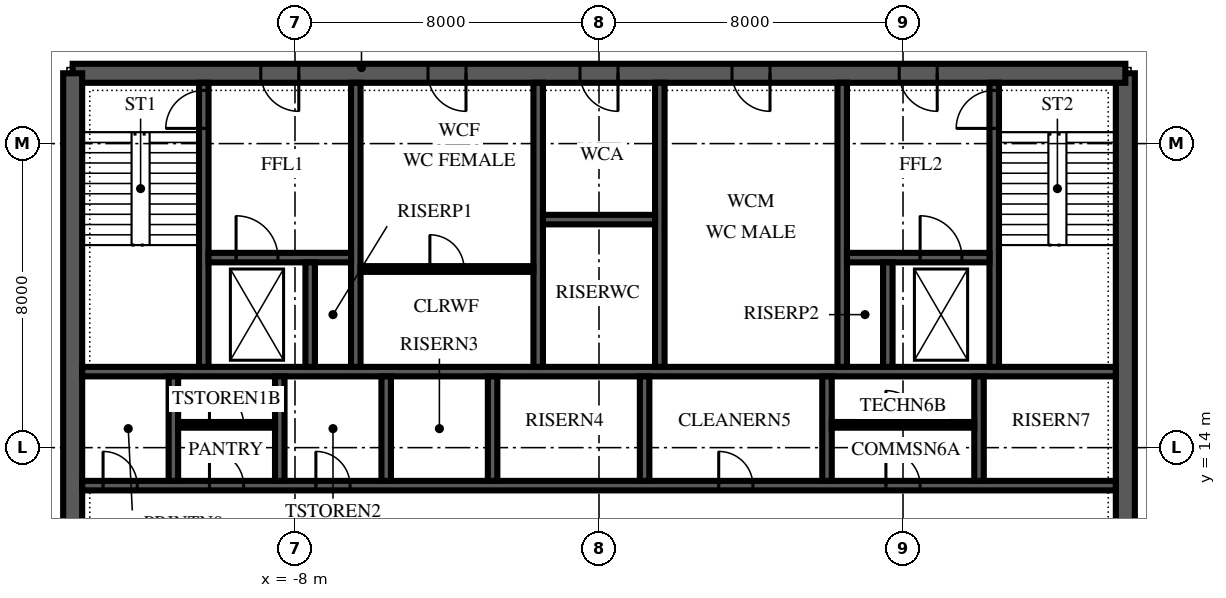
"""IFC4 building model, lengths in metres.
Left out: names, types, materials, properties, quantities, classifications, styles, units other than length and angle.
Written with IfcOpenShell. Run it as: python <this file> out.ifc"""

import sys

from ifc_helpers import new_model, si_unit, direction, frame, frame_2d, origin, place, context, subcontext, project, spatial, polyline, rectangle, outline, extrude, element, fill, save


model = new_model("IFC4")
c1 = context("Model", 3, precision=1e-05, world=origin(), true_north=direction((0.0, 1.0)))
c2 = subcontext(c1, "Body", "Model", "MODEL_VIEW")
j1 = project(units=[si_unit("LENGTHUNIT", "METRE"), si_unit("PLANEANGLEUNIT", "RADIAN")], contexts=[c1])
p1 = place(None, origin())
s1 = spatial("IfcSite", under=j1, at=p1, CompositionType="ELEMENT")
p2 = place(p1, origin())
s2 = spatial("IfcBuilding", under=s1, at=p2, CompositionType="ELEMENT")
p3 = place(p2, frame((0.0, 0.0, 248.0)))
s3 = spatial("IfcBuildingStorey", under=s2, at=p3, CompositionType="ELEMENT", Elevation=248.0)
p4 = place(p3, frame((13.85, 6.15, 0.0), z_axis=(0.0, 0.0, 1.0), x_axis=(0.0, 1.0, 0.0)))
e1 = element("IfcWall", 1, at=p4, inside=s3, PredefinedType="SHEAR", context=c2, shape_type="SweptSolid", body=[
    extrude(outline(polyline([(0.0, -0.25), (17.7, -0.25), (17.7, 0.0), (17.45, 0.0), (17.45, 0.25), (0.25, 0.25), (0.25, 0.0), (0.0, 0.0), (0.0, -0.25)])), origin(), (0.0, 0.0, 1.0), 4.0),
])
p5 = place(p4, frame((4.15, 0.0, 0.0)))
e2 = element("IfcOpeningElement", 2, at=p5, cuts=e1, PredefinedType="OPENING", context=c2, shape_type="SweptSolid", body=[
    extrude(rectangle(XDim=1.8, YDim=2.4, at=frame_2d((0.9, 1.2))), frame((0.0, 0.265, 0.0), z_axis=(0.0, -1.0, 0.0), x_axis=(1.0, 0.0, 0.0)), (0.0, 0.0, 1.0), 0.53),
])
p6 = place(p3, frame((13.85, 23.85, 0.0), z_axis=(0.0, 0.0, 1.0), x_axis=(-1.0, 0.0, 0.0)))
e3 = element("IfcWall", 3, at=p6, inside=s3, PredefinedType="SHEAR", context=c2, shape_type="SweptSolid", body=[
    extrude(rectangle(XDim=27.7, YDim=0.5, at=frame_2d((13.85, 0.0))), origin(), (0.0, 0.0, 1.0), 4.0),
])
p7 = place(p6, frame((21.75, 0.0, 0.0)))
e4 = element("IfcOpeningElement", 4, at=p7, cuts=e3, PredefinedType="OPENING", context=c2, shape_type="SweptSolid", body=[
    extrude(rectangle(XDim=1.0, YDim=2.1, at=frame_2d((0.5, 1.05))), frame((0.0, 0.265, 0.0), z_axis=(0.0, -1.0, 0.0), x_axis=(1.0, 0.0, 0.0)), (0.0, 0.0, 1.0), 0.53),
])
p8 = place(p6, frame((4.95, 0.0, 0.0)))
e5 = element("IfcOpeningElement", 5, at=p8, cuts=e3, PredefinedType="OPENING", context=c2, shape_type="SweptSolid", body=[
    extrude(rectangle(XDim=1.0, YDim=2.1, at=frame_2d((0.5, 1.05))), frame((0.0, 0.265, 0.0), z_axis=(0.0, -1.0, 0.0), x_axis=(1.0, 0.0, 0.0)), (0.0, 0.0, 1.0), 0.53),
])
p9 = place(p6, frame((17.35, 0.0, 0.0)))
e6 = element("IfcOpeningElement", 6, at=p9, cuts=e3, PredefinedType="OPENING", context=c2, shape_type="SweptSolid", body=[
    extrude(rectangle(XDim=1.0, YDim=2.1, at=frame_2d((0.5, 1.05))), frame((0.0, 0.265, 0.0), z_axis=(0.0, -1.0, 0.0), x_axis=(1.0, 0.0, 0.0)), (0.0, 0.0, 1.0), 0.53),
])
p10 = place(p6, frame((13.35, 0.0, 0.0)))
e7 = element("IfcOpeningElement", 7, at=p10, cuts=e3, PredefinedType="OPENING", context=c2, shape_type="SweptSolid", body=[
    extrude(rectangle(XDim=1.0, YDim=2.1, at=frame_2d((0.5, 1.05))), frame((0.0, 0.265, 0.0), z_axis=(0.0, -1.0, 0.0), x_axis=(1.0, 0.0, 0.0)), (0.0, 0.0, 1.0), 0.53),
])
p11 = place(p6, frame((9.35, 0.0, 0.0)))
e8 = element("IfcOpeningElement", 8, at=p11, cuts=e3, PredefinedType="OPENING", context=c2, shape_type="SweptSolid", body=[
    extrude(rectangle(XDim=1.0, YDim=2.1, at=frame_2d((0.5, 1.05))), frame((0.0, 0.265, 0.0), z_axis=(0.0, -1.0, 0.0), x_axis=(1.0, 0.0, 0.0)), (0.0, 0.0, 1.0), 0.53),
])
p12 = place(p3, frame((-13.85, 23.85, 0.0), z_axis=(0.0, 0.0, 1.0), x_axis=(0.0, -1.0, 0.0)))
e9 = element("IfcWall", 9, at=p12, inside=s3, PredefinedType="SHEAR", context=c2, shape_type="SweptSolid", body=[
    extrude(outline(polyline([(0.0, -0.25), (17.7, -0.25), (17.7, 0.0), (17.45, 0.0), (17.45, 0.25), (0.25, 0.25), (0.25, 0.0), (0.0, 0.0), (0.0, -0.25)])), origin(), (0.0, 0.0, 1.0), 4.0),
])
p13 = place(p12, frame((11.75, 0.0, 0.0)))
e10 = element("IfcOpeningElement", 10, at=p13, cuts=e9, PredefinedType="OPENING", context=c2, shape_type="SweptSolid", body=[
    extrude(rectangle(XDim=1.8, YDim=2.4, at=frame_2d((0.9, 1.2))), frame((0.0, 0.265, 0.0), z_axis=(0.0, -1.0, 0.0), x_axis=(1.0, 0.0, 0.0)), (0.0, 0.0, 1.0), 0.53),
])
p14 = place(p3, frame((-13.6, 13.0, 0.0), z_axis=(0.0, 0.0, 1.0), x_axis=(1.0, 0.0, 0.0)))
e11 = element("IfcWall", 11, at=p14, inside=s3, PredefinedType="SHEAR", context=c2, shape_type="SweptSolid", body=[
    extrude(rectangle(XDim=27.2, YDim=0.25, at=frame_2d((13.6, 0.0))), origin(), (0.0, 0.0, 1.0), 4.0),
])
p15 = place(p14, frame((16.75, 0.0, 0.0)))
e12 = element("IfcOpeningElement", 12, at=p15, cuts=e11, PredefinedType="OPENING", context=c2, shape_type="SweptSolid", body=[
    extrude(rectangle(XDim=0.9, YDim=2.1, at=frame_2d((0.45, 1.05))), frame((0.0, 0.14, 0.0), z_axis=(0.0, -1.0, 0.0), x_axis=(1.0, 0.0, 0.0)), (0.0, 0.0, 1.0), 0.28),
])
p16 = place(p14, frame((21.15, 0.0, 0.0)))
e13 = element("IfcOpeningElement", 13, at=p16, cuts=e11, PredefinedType="OPENING", context=c2, shape_type="SweptSolid", body=[
    extrude(rectangle(XDim=0.9, YDim=2.1, at=frame_2d((0.45, 1.05))), frame((0.0, 0.14, 0.0), z_axis=(0.0, -1.0, 0.0), x_axis=(1.0, 0.0, 0.0)), (0.0, 0.0, 1.0), 0.28),
])
p17 = place(p14, frame((0.55, 0.0, 0.0)))
e14 = element("IfcOpeningElement", 14, at=p17, cuts=e11, PredefinedType="OPENING", context=c2, shape_type="SweptSolid", body=[
    extrude(rectangle(XDim=0.9, YDim=2.1, at=frame_2d((0.45, 1.05))), frame((0.0, 0.14, 0.0), z_axis=(0.0, -1.0, 0.0), x_axis=(1.0, 0.0, 0.0)), (0.0, 0.0, 1.0), 0.28),
])
p18 = place(p14, frame((3.35, 0.0, 0.0)))
e15 = element("IfcOpeningElement", 15, at=p18, cuts=e11, PredefinedType="OPENING", context=c2, shape_type="SweptSolid", body=[
    extrude(rectangle(XDim=0.9, YDim=2.1, at=frame_2d((0.45, 1.05))), frame((0.0, 0.14, 0.0), z_axis=(0.0, -1.0, 0.0), x_axis=(1.0, 0.0, 0.0)), (0.0, 0.0, 1.0), 0.28),
])
p19 = place(p14, frame((6.15, 0.0, 0.0)))
e16 = element("IfcOpeningElement", 16, at=p19, cuts=e11, PredefinedType="OPENING", context=c2, shape_type="SweptSolid", body=[
    extrude(rectangle(XDim=0.9, YDim=2.1, at=frame_2d((0.45, 1.05))), frame((0.0, 0.14, 0.0), z_axis=(0.0, -1.0, 0.0), x_axis=(1.0, 0.0, 0.0)), (0.0, 0.0, 1.0), 0.28),
])
p20 = place(p3, frame((-13.6, 16.0, 0.0), z_axis=(0.0, 0.0, 1.0), x_axis=(1.0, 0.0, 0.0)))
e17 = element("IfcWall", 17, at=p20, inside=s3, PredefinedType="SHEAR", context=c2, shape_type="SweptSolid", body=[
    extrude(rectangle(XDim=27.2, YDim=0.25, at=frame_2d((13.6, 0.0))), origin(), (0.0, 0.0, 1.0), 4.0),
])
for number, where, z_axis, x_axis in (
    (18, (-11.2, 13.125, 0.0), (0.0, 0.0, 1.0), (0.0, 1.0, 0.0)),
    (19, (-8.4, 13.125, 0.0), (0.0, 0.0, 1.0), (0.0, 1.0, 0.0)),
    (20, (-5.6, 13.125, 0.0), (0.0, 0.0, 1.0), (0.0, 1.0, 0.0)),
    (21, (-2.8, 13.125, 0.0), (0.0, 0.0, 1.0), (0.0, 1.0, 0.0)),
    (22, (1.2, 13.125, 0.0), (0.0, 0.0, 1.0), (0.0, 1.0, 0.0)),
    (23, (6.0, 13.125, 0.0), (0.0, 0.0, 1.0), (0.0, 1.0, 0.0)),
    (24, (10.0, 13.125, 0.0), (0.0, 0.0, 1.0), (0.0, 1.0, 0.0)),
):
    element("IfcWall", number, at=place(p3, frame(where, z_axis=z_axis, x_axis=x_axis)), inside=s3, PredefinedType="SHEAR", context=c2, shape_type="SweptSolid", body=[
        extrude(rectangle(XDim=2.75, YDim=0.25, at=frame_2d((1.375, 0.0))), origin(), (0.0, 0.0, 1.0), 4.0),
    ])
p21 = place(p3, frame((-10.4, 16.125, 0.0), z_axis=(0.0, 0.0, 1.0), x_axis=(0.0, 1.0, 0.0)))
e25 = element("IfcWall", 25, at=p21, inside=s3, PredefinedType="SHEAR", context=c2, shape_type="SweptSolid", body=[
    extrude(rectangle(XDim=7.475, YDim=0.25, at=frame_2d((3.738, 0.0))), origin(), (0.0, 0.0, 1.0), 4.0),
])
p22 = place(p21, frame((6.275, 0.0, 0.0)))
e26 = element("IfcOpeningElement", 26, at=p22, cuts=e25, PredefinedType="OPENING", context=c2, shape_type="SweptSolid", body=[
    extrude(rectangle(XDim=1.0, YDim=2.1, at=frame_2d((0.5, 1.05))), frame((0.0, 0.14, 0.0), z_axis=(0.0, -1.0, 0.0), x_axis=(1.0, 0.0, 0.0)), (0.0, 0.0, 1.0), 0.28),
])
for number, where, z_axis, x_axis in (
    (27, (-6.4, 16.125, 0.0), (0.0, 0.0, 1.0), (0.0, 1.0, 0.0)),
    (28, (-1.6, 16.125, 0.0), (0.0, 0.0, 1.0), (0.0, 1.0, 0.0)),
    (29, (1.6, 16.125, 0.0), (0.0, 0.0, 1.0), (0.0, 1.0, 0.0)),
    (30, (6.4, 16.125, 0.0), (0.0, 0.0, 1.0), (0.0, 1.0, 0.0)),
):
    element("IfcWall", number, at=place(p3, frame(where, z_axis=z_axis, x_axis=x_axis)), inside=s3, PredefinedType="SHEAR", context=c2, shape_type="SweptSolid", body=[
        extrude(rectangle(XDim=7.475, YDim=0.25, at=frame_2d((3.738, 0.0))), origin(), (0.0, 0.0, 1.0), 4.0),
    ])
p23 = place(p3, frame((10.4, 16.125, 0.0), z_axis=(0.0, 0.0, 1.0), x_axis=(0.0, 1.0, 0.0)))
e31 = element("IfcWall", 31, at=p23, inside=s3, PredefinedType="SHEAR", context=c2, shape_type="SweptSolid", body=[
    extrude(rectangle(XDim=7.475, YDim=0.25, at=frame_2d((3.738, 0.0))), origin(), (0.0, 0.0, 1.0), 4.0),
])
p24 = place(p23, frame((6.275, 0.0, 0.0)))
e32 = element("IfcOpeningElement", 32, at=p24, cuts=e31, PredefinedType="OPENING", context=c2, shape_type="SweptSolid", body=[
    extrude(rectangle(XDim=1.0, YDim=2.1, at=frame_2d((0.5, 1.05))), frame((0.0, 0.14, 0.0), z_axis=(0.0, -1.0, 0.0), x_axis=(1.0, 0.0, 0.0)), (0.0, 0.0, 1.0), 0.28),
])
p25 = place(p3, frame((-10.275, 19.0, 0.0), z_axis=(0.0, 0.0, 1.0), x_axis=(1.0, 0.0, 0.0)))
e33 = element("IfcWall", 33, at=p25, inside=s3, PredefinedType="SHEAR", context=c2, shape_type="SweptSolid", body=[
    extrude(rectangle(XDim=3.75, YDim=0.25, at=frame_2d((1.875, 0.0))), origin(), (0.0, 0.0, 1.0), 4.0),
])
p26 = place(p25, frame((0.725, 0.0, 0.0)))
e34 = element("IfcOpeningElement", 34, at=p26, cuts=e33, PredefinedType="OPENING", context=c2, shape_type="SweptSolid", body=[
    extrude(rectangle(XDim=1.1, YDim=2.1, at=frame_2d((0.55, 1.05))), frame((0.0, 0.14, 0.0), z_axis=(0.0, -1.0, 0.0), x_axis=(1.0, 0.0, 0.0)), (0.0, 0.0, 1.0), 0.28),
])
p27 = place(p3, frame((6.525, 19.0, 0.0), z_axis=(0.0, 0.0, 1.0), x_axis=(1.0, 0.0, 0.0)))
e35 = element("IfcWall", 35, at=p27, inside=s3, PredefinedType="SHEAR", context=c2, shape_type="SweptSolid", body=[
    extrude(rectangle(XDim=3.75, YDim=0.25, at=frame_2d((1.875, 0.0))), origin(), (0.0, 0.0, 1.0), 4.0),
])
p28 = place(p27, frame((1.925, 0.0, 0.0)))
e36 = element("IfcOpeningElement", 36, at=p28, cuts=e35, PredefinedType="OPENING", context=c2, shape_type="SweptSolid", body=[
    extrude(rectangle(XDim=1.1, YDim=2.1, at=frame_2d((0.55, 1.05))), frame((0.0, 0.14, 0.0), z_axis=(0.0, -1.0, 0.0), x_axis=(1.0, 0.0, 0.0)), (0.0, 0.0, 1.0), 0.28),
])
for number, where, z_axis, x_axis in (
    (37, (-7.6, 16.125, 0.0), (0.0, 0.0, 1.0), (0.0, 1.0, 0.0)),
    (38, (7.6, 16.125, 0.0), (0.0, 0.0, 1.0), (0.0, 1.0, 0.0)),
):
    element("IfcWall", number, at=place(p3, frame(where, z_axis=z_axis, x_axis=x_axis)), inside=s3, PredefinedType="SHEAR", context=c2, shape_type="SweptSolid", body=[
        extrude(rectangle(XDim=2.75, YDim=0.25, at=frame_2d((1.375, 0.0))), origin(), (0.0, 0.0, 1.0), 4.0),
    ])
p29 = place(p3, frame((-1.475, 20.0, 0.0), z_axis=(0.0, 0.0, 1.0), x_axis=(1.0, 0.0, 0.0)))
e39 = element("IfcWall", 39, at=p29, inside=s3, PredefinedType="SHEAR", context=c2, shape_type="SweptSolid", body=[
    extrude(rectangle(XDim=2.95, YDim=0.25, at=frame_2d((1.475, 0.0))), origin(), (0.0, 0.0, 1.0), 4.0),
])
p30 = place(p3, frame((-6.275, 18.7, 0.0), z_axis=(0.0, 0.0, 1.0), x_axis=(1.0, 0.0, 0.0)))
e40 = element("IfcWall", 40, at=p30, inside=s3, PredefinedType="PARTITIONING", context=c2, shape_type="SweptSolid", body=[
    extrude(rectangle(XDim=4.55, YDim=0.15, at=frame_2d((2.275, 0.0))), origin(), (0.0, 0.0, 1.0), 3.85),
])
p31 = place(p30, frame((1.825, 0.0, 0.0)))
e41 = element("IfcOpeningElement", 41, at=p31, cuts=e40, PredefinedType="OPENING", context=c2, shape_type="SweptSolid", body=[
    extrude(rectangle(XDim=0.9, YDim=2.1, at=frame_2d((0.45, 1.05))), frame((0.0, 0.09, 0.0), z_axis=(0.0, -1.0, 0.0), x_axis=(1.0, 0.0, 0.0)), (0.0, 0.0, 1.0), 0.18),
])
p32 = place(p3, frame((6.125, 14.6, 0.0), z_axis=(0.0, 0.0, 1.0), x_axis=(1.0, 0.0, 0.0)))
e42 = element("IfcWall", 42, at=p32, inside=s3, PredefinedType="PARTITIONING", context=c2, shape_type="SweptSolid", body=[
    extrude(rectangle(XDim=3.75, YDim=0.15, at=frame_2d((1.875, 0.0))), origin(), (0.0, 0.0, 1.0), 3.85),
])
p33 = place(p32, frame((1.425, 0.0, 0.0)))
e43 = element("IfcOpeningElement", 43, at=p33, cuts=e42, PredefinedType="OPENING", context=c2, shape_type="SweptSolid", body=[
    extrude(rectangle(XDim=0.9, YDim=2.1, at=frame_2d((0.45, 1.05))), frame((0.0, 0.09, 0.0), z_axis=(0.0, -1.0, 0.0), x_axis=(1.0, 0.0, 0.0)), (0.0, 0.0, 1.0), 0.18),
])
p34 = place(p3, frame((-11.075, 14.6, 0.0), z_axis=(0.0, 0.0, 1.0), x_axis=(1.0, 0.0, 0.0)))
e44 = element("IfcWall", 44, at=p34, inside=s3, PredefinedType="PARTITIONING", context=c2, shape_type="SweptSolid", body=[
    extrude(rectangle(XDim=2.55, YDim=0.15, at=frame_2d((1.275, 0.0))), origin(), (0.0, 0.0, 1.0), 3.85),
])
p35 = place(p34, frame((0.825, 0.0, 0.0)))
e45 = element("IfcOpeningElement", 45, at=p35, cuts=e44, PredefinedType="OPENING", context=c2, shape_type="SweptSolid", body=[
    extrude(rectangle(XDim=0.9, YDim=2.1, at=frame_2d((0.45, 1.05))), frame((0.0, 0.09, 0.0), z_axis=(0.0, -1.0, 0.0), x_axis=(1.0, 0.0, 0.0)), (0.0, 0.0, 1.0), 0.18),
])
p36 = place(p7, origin())
e46 = element("IfcDoor", 46, at=p36, inside=s3, OperationType="SINGLE_SWING_RIGHT", PredefinedType="DOOR", context=c2, shape_type="SweptSolid", body=[
    extrude(rectangle(XDim=1.0, YDim=2.1, at=frame_2d((0.5, 1.05))), frame((0.0, 0.25, 0.0), z_axis=(0.0, -1.0, 0.0), x_axis=(1.0, 0.0, 0.0)), (0.0, 0.0, 1.0), 0.5),
])
fill(e4, e46)
p37 = place(p8, origin())
e47 = element("IfcDoor", 47, at=p37, inside=s3, OperationType="SINGLE_SWING_RIGHT", PredefinedType="DOOR", context=c2, shape_type="SweptSolid", body=[
    extrude(rectangle(XDim=1.0, YDim=2.1, at=frame_2d((0.5, 1.05))), frame((0.0, 0.25, 0.0), z_axis=(0.0, -1.0, 0.0), x_axis=(1.0, 0.0, 0.0)), (0.0, 0.0, 1.0), 0.5),
])
fill(e5, e47)
p38 = place(p9, origin())
e48 = element("IfcDoor", 48, at=p38, inside=s3, OperationType="SINGLE_SWING_LEFT", PredefinedType="DOOR", context=c2, shape_type="SweptSolid", body=[
    extrude(rectangle(XDim=1.0, YDim=2.1, at=frame_2d((0.5, 1.05))), frame((0.0, 0.25, 0.0), z_axis=(0.0, -1.0, 0.0), x_axis=(1.0, 0.0, 0.0)), (0.0, 0.0, 1.0), 0.5),
])
fill(e6, e48)
p39 = place(p10, origin())
e49 = element("IfcDoor", 49, at=p39, inside=s3, OperationType="SINGLE_SWING_LEFT", PredefinedType="DOOR", context=c2, shape_type="SweptSolid", body=[
    extrude(rectangle(XDim=1.0, YDim=2.1, at=frame_2d((0.5, 1.05))), frame((0.0, 0.25, 0.0), z_axis=(0.0, -1.0, 0.0), x_axis=(1.0, 0.0, 0.0)), (0.0, 0.0, 1.0), 0.5),
])
fill(e7, e49)
p40 = place(p11, origin())
e50 = element("IfcDoor", 50, at=p40, inside=s3, OperationType="SINGLE_SWING_LEFT", PredefinedType="DOOR", context=c2, shape_type="SweptSolid", body=[
    extrude(rectangle(XDim=1.0, YDim=2.1, at=frame_2d((0.5, 1.05))), frame((0.0, 0.25, 0.0), z_axis=(0.0, -1.0, 0.0), x_axis=(1.0, 0.0, 0.0)), (0.0, 0.0, 1.0), 0.5),
])
fill(e8, e50)
p41 = place(p22, origin())
e51 = element("IfcDoor", 51, at=p41, inside=s3, OperationType="SINGLE_SWING_LEFT", PredefinedType="DOOR", context=c2, shape_type="SweptSolid", body=[
    extrude(rectangle(XDim=1.0, YDim=2.1, at=frame_2d((0.5, 1.05))), frame((0.0, 0.125, 0.0), z_axis=(0.0, -1.0, 0.0), x_axis=(1.0, 0.0, 0.0)), (0.0, 0.0, 1.0), 0.25),
])
fill(e26, e51)
p42 = place(p24, origin())
e52 = element("IfcDoor", 52, at=p42, inside=s3, OperationType="SINGLE_SWING_LEFT", PredefinedType="DOOR", context=c2, shape_type="SweptSolid", body=[
    extrude(rectangle(XDim=1.0, YDim=2.1, at=frame_2d((0.5, 1.05))), frame((0.0, 0.125, 0.0), z_axis=(0.0, -1.0, 0.0), x_axis=(1.0, 0.0, 0.0)), (0.0, 0.0, 1.0), 0.25),
])
fill(e32, e52)
p43 = place(p28, origin())
e53 = element("IfcDoor", 53, at=p43, inside=s3, OperationType="SLIDING_TO_RIGHT", PredefinedType="DOOR", context=c2, shape_type="SweptSolid", body=[
    extrude(rectangle(XDim=1.1, YDim=2.1, at=frame_2d((0.55, 1.05))), frame((0.0, 0.125, 0.0), z_axis=(0.0, -1.0, 0.0), x_axis=(1.0, 0.0, 0.0)), (0.0, 0.0, 1.0), 0.25),
])
fill(e36, e53)
p44 = place(p26, origin())
e54 = element("IfcDoor", 54, at=p44, inside=s3, OperationType="SLIDING_TO_RIGHT", PredefinedType="DOOR", context=c2, shape_type="SweptSolid", body=[
    extrude(rectangle(XDim=1.1, YDim=2.1, at=frame_2d((0.55, 1.05))), frame((0.0, 0.125, 0.0), z_axis=(0.0, -1.0, 0.0), x_axis=(1.0, 0.0, 0.0)), (0.0, 0.0, 1.0), 0.25),
])
fill(e34, e54)
p45 = place(p15, origin())
e55 = element("IfcDoor", 55, at=p45, inside=s3, OperationType="SINGLE_SWING_LEFT", PredefinedType="DOOR", context=c2, shape_type="SweptSolid", body=[
    extrude(rectangle(XDim=0.9, YDim=2.1, at=frame_2d((0.45, 1.05))), frame((0.0, 0.125, 0.0), z_axis=(0.0, -1.0, 0.0), x_axis=(1.0, 0.0, 0.0)), (0.0, 0.0, 1.0), 0.25),
])
fill(e12, e55)
p46 = place(p16, origin())
e56 = element("IfcDoor", 56, at=p46, inside=s3, OperationType="SINGLE_SWING_LEFT", PredefinedType="DOOR", context=c2, shape_type="SweptSolid", body=[
    extrude(rectangle(XDim=0.9, YDim=2.1, at=frame_2d((0.45, 1.05))), frame((0.0, 0.125, 0.0), z_axis=(0.0, -1.0, 0.0), x_axis=(1.0, 0.0, 0.0)), (0.0, 0.0, 1.0), 0.25),
])
fill(e13, e56)
p47 = place(p33, origin())
e57 = element("IfcDoor", 57, at=p47, inside=s3, OperationType="SINGLE_SWING_LEFT", PredefinedType="DOOR", context=c2, shape_type="SweptSolid", body=[
    extrude(rectangle(XDim=0.9, YDim=2.1, at=frame_2d((0.45, 1.05))), frame((0.0, 0.075, 0.0), z_axis=(0.0, -1.0, 0.0), x_axis=(1.0, 0.0, 0.0)), (0.0, 0.0, 1.0), 0.149),
])
fill(e43, e57)
p48 = place(p17, origin())
e58 = element("IfcDoor", 58, at=p48, inside=s3, OperationType="SINGLE_SWING_LEFT", PredefinedType="DOOR", context=c2, shape_type="SweptSolid", body=[
    extrude(rectangle(XDim=0.9, YDim=2.1, at=frame_2d((0.45, 1.05))), frame((0.0, 0.125, 0.0), z_axis=(0.0, -1.0, 0.0), x_axis=(1.0, 0.0, 0.0)), (0.0, 0.0, 1.0), 0.25),
])
fill(e14, e58)
p49 = place(p18, origin())
e59 = element("IfcDoor", 59, at=p49, inside=s3, OperationType="SINGLE_SWING_LEFT", PredefinedType="DOOR", context=c2, shape_type="SweptSolid", body=[
    extrude(rectangle(XDim=0.9, YDim=2.1, at=frame_2d((0.45, 1.05))), frame((0.0, 0.125, 0.0), z_axis=(0.0, -1.0, 0.0), x_axis=(1.0, 0.0, 0.0)), (0.0, 0.0, 1.0), 0.25),
])
fill(e15, e59)
p50 = place(p35, origin())
e60 = element("IfcDoor", 60, at=p50, inside=s3, OperationType="SINGLE_SWING_LEFT", PredefinedType="DOOR", context=c2, shape_type="SweptSolid", body=[
    extrude(rectangle(XDim=0.9, YDim=2.1, at=frame_2d((0.45, 1.05))), frame((0.0, 0.075, 0.0), z_axis=(0.0, -1.0, 0.0), x_axis=(1.0, 0.0, 0.0)), (0.0, 0.0, 1.0), 0.149),
])
fill(e45, e60)
p51 = place(p19, origin())
e61 = element("IfcDoor", 61, at=p51, inside=s3, OperationType="SINGLE_SWING_LEFT", PredefinedType="DOOR", context=c2, shape_type="SweptSolid", body=[
    extrude(rectangle(XDim=0.9, YDim=2.1, at=frame_2d((0.45, 1.05))), frame((0.0, 0.125, 0.0), z_axis=(0.0, -1.0, 0.0), x_axis=(1.0, 0.0, 0.0)), (0.0, 0.0, 1.0), 0.25),
])
fill(e16, e61)
p52 = place(p31, origin())
e62 = element("IfcDoor", 62, at=p52, inside=s3, OperationType="SINGLE_SWING_LEFT", PredefinedType="DOOR", context=c2, shape_type="SweptSolid", body=[
    extrude(rectangle(XDim=0.9, YDim=2.1, at=frame_2d((0.45, 1.05))), frame((0.0, 0.075, 0.0), z_axis=(0.0, -1.0, 0.0), x_axis=(1.0, 0.0, 0.0)), (0.0, 0.0, 1.0), 0.149),
])
fill(e41, e62)
save(model, sys.argv[1])
